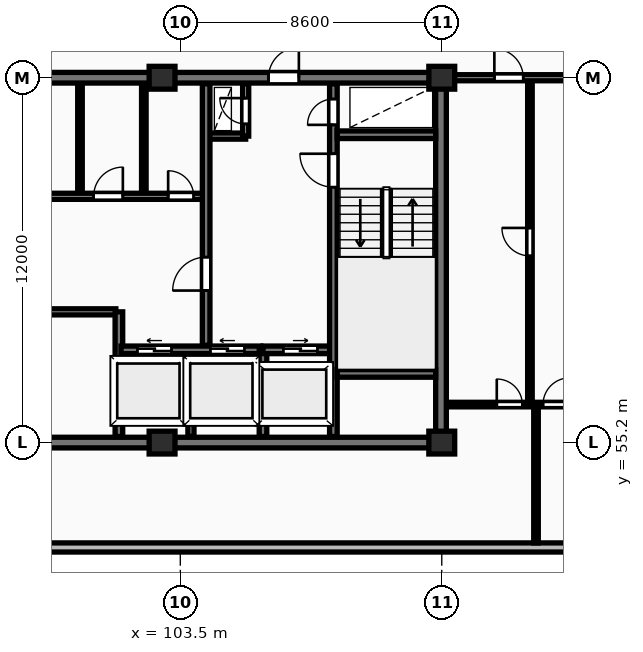
"""IFC4 building model, lengths in metres.
Left out: names, types, materials, properties, quantities, classifications, styles, units other than length and angle.
Written with IfcOpenShell. Run it as: python <this file> out.ifc"""

import sys

from ifc_helpers import new_model, si_unit, direction, frame, frame_2d, origin, origin_2d, place, context, subcontext, project, spatial, rectangle, extrude, element, fill, save


model = new_model("IFC4")
c1 = context("Model", 3, precision=1e-05, world=origin(), true_north=direction((0.0, 1.0)))
c2 = subcontext(c1, "Body", "Model", "MODEL_VIEW")
j1 = project(units=[si_unit("LENGTHUNIT", "METRE"), si_unit("PLANEANGLEUNIT", "RADIAN")], contexts=[c1])
p1 = place(None, origin())
s1 = spatial("IfcSite", under=j1, at=p1, CompositionType="ELEMENT")
p2 = place(p1, origin())
s2 = spatial("IfcBuilding", under=s1, at=p2, CompositionType="ELEMENT")
p3 = place(p2, frame((0.0, 0.0, 201.1)))
s3 = spatial("IfcBuildingStorey", under=s2, at=p3, CompositionType="ELEMENT", Elevation=201.1)
for number, where, z_axis, x_axis in (
    (1, (102.9, 55.2, 0.0), (0.0, 0.0, 1.0), (1.0, 0.0, 0.0)),
    (2, (102.9, 67.2, 0.0), (0.0, 0.0, 1.0), (1.0, 0.0, 0.0)),
    (3, (112.1, 55.2, 0.0), (0.0, 0.0, 1.0), (1.0, 0.0, 0.0)),
    (4, (112.1, 67.2, 0.0), (0.0, 0.0, 1.0), (1.0, 0.0, 0.0)),
):
    element("IfcColumn", number, at=place(p3, frame(where, z_axis=z_axis, x_axis=x_axis)), inside=s3, PredefinedType="COLUMN", context=c2, shape_type="SweptSolid", body=[
        extrude(rectangle(XDim=0.85, YDim=0.75, at=origin_2d()), origin(), (0.0, 0.0, 1.0), 3.25),
    ])
p4 = place(p3, frame((59.8, 51.75, 0.0), z_axis=(0.0, 0.0, 1.0), x_axis=(1.0, 0.0, 0.0)))
e5 = element("IfcWall", 5, at=p4, inside=s3, PredefinedType="STANDARD", context=c2, shape_type="SweptSolid", body=[
    extrude(rectangle(XDim=68.6, YDim=0.3, at=frame_2d((34.3, 0.0))), origin(), (0.0, 0.0, 1.0), 2.97),
])
p5 = place(p4, frame((13.025, 0.0, 0.85)))
e6 = element("IfcOpeningElement", 6, at=p5, cuts=e5, PredefinedType="OPENING", context=c2, shape_type="SweptSolid", body=[
    extrude(rectangle(XDim=1.8, YDim=1.8, at=frame_2d((0.9, 0.9))), frame((0.0, 0.16, 0.0), z_axis=(0.0, -1.0, 0.0), x_axis=(1.0, 0.0, 0.0)), (0.0, 0.0, 1.0), 0.32),
])
p6 = place(p4, frame((56.375, 0.0, 0.85)))
e7 = element("IfcOpeningElement", 7, at=p6, cuts=e5, PredefinedType="OPENING", context=c2, shape_type="SweptSolid", body=[
    extrude(rectangle(XDim=1.8, YDim=1.8, at=frame_2d((0.9, 0.9))), frame((0.0, 0.16, 0.0), z_axis=(0.0, -1.0, 0.0), x_axis=(1.0, 0.0, 0.0)), (0.0, 0.0, 1.0), 0.32),
])
p7 = place(p3, frame((75.95, 55.2, 0.0), z_axis=(0.0, 0.0, 1.0), x_axis=(1.0, 0.0, 0.0)))
e8 = element("IfcWall", 8, at=p7, inside=s3, PredefinedType="SHEAR", context=c2, shape_type="SweptSolid", body=[
    extrude(rectangle(XDim=36.3, YDim=0.35, at=frame_2d((18.15, 0.0))), origin(), (0.0, 0.0, 1.0), 3.25),
])
p8 = place(p3, frame((112.075, 55.375, 0.0), z_axis=(0.0, 0.0, 1.0), x_axis=(0.0, 1.0, 0.0)))
e9 = element("IfcWall", 9, at=p8, inside=s3, PredefinedType="SHEAR", context=c2, shape_type="SweptSolid", body=[
    extrude(rectangle(XDim=11.65, YDim=0.35, at=frame_2d((5.825, 0.0))), origin(), (0.0, 0.0, 1.0), 3.25),
])
p9 = place(p3, frame((75.95, 67.2, 0.0), z_axis=(0.0, 0.0, 1.0), x_axis=(1.0, 0.0, 0.0)))
e10 = element("IfcWall", 10, at=p9, inside=s3, PredefinedType="SHEAR", context=c2, shape_type="SweptSolid", body=[
    extrude(rectangle(XDim=36.3, YDim=0.35, at=frame_2d((18.15, 0.0))), origin(), (0.0, 0.0, 1.0), 3.25),
])
p10 = place(p9, frame((5.25, 0.0, 0.0)))
e11 = element("IfcOpeningElement", 11, at=p10, cuts=e10, PredefinedType="OPENING", context=c2, shape_type="SweptSolid", body=[
    extrude(rectangle(XDim=1.0, YDim=2.15, at=frame_2d((0.5, 1.075))), frame((0.0, 0.185, 0.0), z_axis=(0.0, -1.0, 0.0), x_axis=(1.0, 0.0, 0.0)), (0.0, 0.0, 1.0), 0.37),
])
p11 = place(p9, frame((21.6, 0.0, 0.0)))
e12 = element("IfcOpeningElement", 12, at=p11, cuts=e10, PredefinedType="OPENING", context=c2, shape_type="SweptSolid", body=[
    extrude(rectangle(XDim=1.5, YDim=2.2, at=frame_2d((0.75, 1.1))), frame((0.0, 0.185, 0.0), z_axis=(0.0, -1.0, 0.0), x_axis=(1.0, 0.0, 0.0)), (0.0, 0.0, 1.0), 0.37),
])
p12 = place(p9, frame((30.45, 0.0, 0.0)))
e13 = element("IfcOpeningElement", 13, at=p12, cuts=e10, PredefinedType="OPENING", context=c2, shape_type="SweptSolid", body=[
    extrude(rectangle(XDim=1.0, YDim=2.15, at=frame_2d((0.5, 1.075))), frame((0.0, 0.185, 0.0), z_axis=(0.0, -1.0, 0.0), x_axis=(1.0, 0.0, 0.0)), (0.0, 0.0, 1.0), 0.37),
])
p13 = place(p3, frame((93.02, 59.5, 0.0), z_axis=(0.0, 0.0, 1.0), x_axis=(1.0, 0.0, 0.0)))
e14 = element("IfcWall", 14, at=p13, inside=s3, PredefinedType="PARTITIONING", context=c2, shape_type="SweptSolid", body=[
    extrude(rectangle(XDim=8.36, YDim=0.2, at=frame_2d((4.18, 0.0))), origin(), (0.0, 0.0, 1.0), 2.97),
])
p14 = place(p13, frame((3.4, 0.0, 0.0)))
e15 = element("IfcOpeningElement", 15, at=p14, cuts=e14, PredefinedType="OPENING", context=c2, shape_type="SweptSolid", body=[
    extrude(rectangle(XDim=0.92, YDim=2.08, at=frame_2d((0.46, 1.04))), frame((0.0, 0.11, 0.0), z_axis=(0.0, -1.0, 0.0), x_axis=(1.0, 0.0, 0.0)), (0.0, 0.0, 1.0), 0.22),
])
p15 = place(p3, frame((101.48, 55.4, 0.0), z_axis=(0.0, 0.0, 1.0), x_axis=(0.0, 1.0, 0.0)))
e16 = element("IfcWall", 16, at=p15, inside=s3, PredefinedType="SHEAR", context=c2, shape_type="SweptSolid", body=[
    extrude(rectangle(XDim=4.1, YDim=0.25, at=frame_2d((2.05, 0.0))), origin(), (0.0, 0.0, 1.0), 3.25),
])
p16 = place(p3, frame((103.85, 55.4, 0.0), z_axis=(0.0, 0.0, 1.0), x_axis=(0.0, 1.0, 0.0)))
e17 = element("IfcWall", 17, at=p16, inside=s3, PredefinedType="PARTITIONING", context=c2, shape_type="SweptSolid", body=[
    extrude(rectangle(XDim=2.72, YDim=0.2, at=frame_2d((1.36, 0.0))), origin(), (0.0, 0.0, 1.0), 2.97),
])
p17 = place(p3, frame((101.55, 58.25, 0.0), z_axis=(0.0, 0.0, 1.0), x_axis=(1.0, 0.0, 0.0)))
e18 = element("IfcWall", 18, at=p17, inside=s3, PredefinedType="SHEAR", context=c2, shape_type="SweptSolid", body=[
    extrude(rectangle(XDim=4.6, YDim=0.25, at=frame_2d((2.3, 0.0))), origin(), (0.0, 0.0, 1.0), 3.25),
])
p18 = place(p17, frame((0.54, 0.0, 0.0)))
e19 = element("IfcOpeningElement", 19, at=p18, cuts=e18, PredefinedType="OPENING", context=c2, shape_type="SweptSolid", body=[
    extrude(rectangle(XDim=1.12, YDim=2.12, at=frame_2d((0.56, 1.06))), frame((0.0, 0.135, 0.0), z_axis=(0.0, -1.0, 0.0), x_axis=(1.0, 0.0, 0.0)), (0.0, 0.0, 1.0), 0.27),
])
p19 = place(p17, frame((2.94, 0.0, 0.0)))
e20 = element("IfcOpeningElement", 20, at=p19, cuts=e18, PredefinedType="OPENING", context=c2, shape_type="SweptSolid", body=[
    extrude(rectangle(XDim=1.12, YDim=2.12, at=frame_2d((0.56, 1.06))), frame((0.0, 0.135, 0.0), z_axis=(0.0, -1.0, 0.0), x_axis=(1.0, 0.0, 0.0)), (0.0, 0.0, 1.0), 0.27),
])
p20 = place(p3, frame((106.22, 55.4, 0.0), z_axis=(0.0, 0.0, 1.0), x_axis=(0.0, 1.0, 0.0)))
e21 = element("IfcWall", 21, at=p20, inside=s3, PredefinedType="SHEAR", context=c2, shape_type="SweptSolid", body=[
    extrude(rectangle(XDim=2.85, YDim=0.25, at=frame_2d((1.425, 0.0))), origin(), (0.0, 0.0, 1.0), 3.25),
])
p21 = place(p3, frame((106.22, 58.25, 0.0), z_axis=(0.0, 0.0, 1.0), x_axis=(1.0, 0.0, 0.0)))
e22 = element("IfcWall", 22, at=p21, inside=s3, PredefinedType="SHEAR", context=c2, shape_type="SweptSolid", body=[
    extrude(rectangle(XDim=2.46, YDim=0.25, at=frame_2d((1.23, 0.0))), origin(), (0.0, 0.0, 1.0), 3.25),
])
p22 = place(p21, frame((0.67, 0.0, 0.0)))
e23 = element("IfcOpeningElement", 23, at=p22, cuts=e22, PredefinedType="OPENING", context=c2, shape_type="SweptSolid", body=[
    extrude(rectangle(XDim=1.12, YDim=2.12, at=frame_2d((0.56, 1.06))), frame((0.0, 0.135, 0.0), z_axis=(0.0, -1.0, 0.0), x_axis=(1.0, 0.0, 0.0)), (0.0, 0.0, 1.0), 0.27),
])
for number, where, z_axis, x_axis in (
    (24, (102.3, 63.4, 0.0), (0.0, 0.0, 1.0), (0.0, 1.0, 0.0)),
    (25, (100.2, 63.4, 0.0), (0.0, 0.0, 1.0), (0.0, 1.0, 0.0)),
):
    element("IfcWall", number, at=place(p3, frame(where, z_axis=z_axis, x_axis=x_axis)), inside=s3, PredefinedType="PARTITIONING", context=c2, shape_type="SweptSolid", body=[
        extrude(rectangle(XDim=3.6, YDim=0.15, at=frame_2d((1.8, 0.0))), origin(), (0.0, 0.0, 1.0), 2.97),
    ])
p23 = place(p3, frame((84.42, 63.3, 0.0), z_axis=(0.0, 0.0, 1.0), x_axis=(1.0, 0.0, 0.0)))
e26 = element("IfcWall", 26, at=p23, inside=s3, PredefinedType="PARTITIONING", context=c2, shape_type="SweptSolid", body=[
    extrude(rectangle(XDim=19.83, YDim=0.2, at=frame_2d((9.915, 0.0))), origin(), (0.0, 0.0, 1.0), 2.97),
])
p24 = place(p23, frame((1.15, 0.0, 0.0)))
e27 = element("IfcOpeningElement", 27, at=p24, cuts=e26, PredefinedType="OPENING", context=c2, shape_type="SweptSolid", body=[
    extrude(rectangle(XDim=0.85, YDim=2.05, at=frame_2d((0.425, 1.025))), frame((0.0, 0.11, 0.0), z_axis=(0.0, -1.0, 0.0), x_axis=(1.0, 0.0, 0.0)), (0.0, 0.0, 1.0), 0.22),
])
p25 = place(p23, frame((3.25, 0.0, 0.0)))
e28 = element("IfcOpeningElement", 28, at=p25, cuts=e26, PredefinedType="OPENING", context=c2, shape_type="SweptSolid", body=[
    extrude(rectangle(XDim=0.85, YDim=2.05, at=frame_2d((0.425, 1.025))), frame((0.0, 0.11, 0.0), z_axis=(0.0, -1.0, 0.0), x_axis=(1.0, 0.0, 0.0)), (0.0, 0.0, 1.0), 0.22),
])
p26 = place(p23, frame((13.08, 0.0, 0.0)))
e29 = element("IfcOpeningElement", 29, at=p26, cuts=e26, PredefinedType="OPENING", context=c2, shape_type="SweptSolid", body=[
    extrude(rectangle(XDim=1.5, YDim=2.2, at=frame_2d((0.75, 1.1))), frame((0.0, 0.11, 0.0), z_axis=(0.0, -1.0, 0.0), x_axis=(1.0, 0.0, 0.0)), (0.0, 0.0, 1.0), 0.22),
])
p27 = place(p23, frame((5.53, 0.0, 0.0)))
e30 = element("IfcOpeningElement", 30, at=p27, cuts=e26, PredefinedType="OPENING", context=c2, shape_type="SweptSolid", body=[
    extrude(rectangle(XDim=0.88, YDim=2.06, at=frame_2d((0.44, 1.03))), frame((0.0, 0.11, 0.0), z_axis=(0.0, -1.0, 0.0), x_axis=(1.0, 0.0, 0.0)), (0.0, 0.0, 1.0), 0.22),
])
p28 = place(p23, frame((7.68, 0.0, 0.0)))
e31 = element("IfcOpeningElement", 31, at=p28, cuts=e26, PredefinedType="OPENING", context=c2, shape_type="SweptSolid", body=[
    extrude(rectangle(XDim=0.88, YDim=2.06, at=frame_2d((0.44, 1.03))), frame((0.0, 0.11, 0.0), z_axis=(0.0, -1.0, 0.0), x_axis=(1.0, 0.0, 0.0)), (0.0, 0.0, 1.0), 0.22),
])
p29 = place(p23, frame((10.43, 0.0, 0.0)))
e32 = element("IfcOpeningElement", 32, at=p29, cuts=e26, PredefinedType="OPENING", context=c2, shape_type="SweptSolid", body=[
    extrude(rectangle(XDim=0.85, YDim=2.05, at=frame_2d((0.425, 1.025))), frame((0.0, 0.11, 0.0), z_axis=(0.0, -1.0, 0.0), x_axis=(1.0, 0.0, 0.0)), (0.0, 0.0, 1.0), 0.22),
])
p30 = place(p23, frame((16.23, 0.0, 0.0)))
e33 = element("IfcOpeningElement", 33, at=p30, cuts=e26, PredefinedType="OPENING", context=c2, shape_type="SweptSolid", body=[
    extrude(rectangle(XDim=0.96, YDim=2.1, at=frame_2d((0.48, 1.05))), frame((0.0, 0.11, 0.0), z_axis=(0.0, -1.0, 0.0), x_axis=(1.0, 0.0, 0.0)), (0.0, 0.0, 1.0), 0.22),
])
p31 = place(p23, frame((18.68, 0.0, 0.0)))
e34 = element("IfcOpeningElement", 34, at=p31, cuts=e26, PredefinedType="OPENING", context=c2, shape_type="SweptSolid", body=[
    extrude(rectangle(XDim=0.84, YDim=2.04, at=frame_2d((0.42, 1.02))), frame((0.0, 0.11, 0.0), z_axis=(0.0, -1.0, 0.0), x_axis=(1.0, 0.0, 0.0)), (0.0, 0.0, 1.0), 0.22),
])
p32 = place(p3, frame((104.45, 65.28, 0.0), z_axis=(0.0, 0.0, 1.0), x_axis=(1.0, 0.0, 0.0)))
e35 = element("IfcWall", 35, at=p32, inside=s3, PredefinedType="PARTITIONING", context=c2, shape_type="SweptSolid", body=[
    extrude(rectangle(XDim=1.2, YDim=0.2, at=frame_2d((0.6, 0.0))), origin(), (0.0, 0.0, 1.0), 2.97),
])
p33 = place(p3, frame((105.65, 65.28, 0.0), z_axis=(0.0, 0.0, 1.0), x_axis=(0.0, 1.0, 0.0)))
e36 = element("IfcWall", 36, at=p33, inside=s3, PredefinedType="PARTITIONING", context=c2, shape_type="SweptSolid", body=[
    extrude(rectangle(XDim=1.72, YDim=0.2, at=frame_2d((0.86, 0.0))), origin(), (0.0, 0.0, 1.0), 2.97),
])
p34 = place(p33, frame((0.4, 0.0, 0.0)))
e37 = element("IfcOpeningElement", 37, at=p34, cuts=e36, PredefinedType="OPENING", context=c2, shape_type="SweptSolid", body=[
    extrude(rectangle(XDim=0.85, YDim=2.05, at=frame_2d((0.425, 1.025))), frame((0.0, 0.11, 0.0), z_axis=(0.0, -1.0, 0.0), x_axis=(1.0, 0.0, 0.0)), (0.0, 0.0, 1.0), 0.22),
])
p35 = place(p3, frame((104.35, 58.4, 0.0), z_axis=(0.0, 0.0, 1.0), x_axis=(0.0, 1.0, 0.0)))
e38 = element("IfcWall", 38, at=p35, inside=s3, PredefinedType="SHEAR", context=c2, shape_type="SweptSolid", body=[
    extrude(rectangle(XDim=8.6, YDim=0.25, at=frame_2d((4.3, 0.0))), origin(), (0.0, 0.0, 1.0), 3.25),
])
p36 = place(p35, frame((1.8, 0.0, 0.0)))
e39 = element("IfcOpeningElement", 39, at=p36, cuts=e38, PredefinedType="OPENING", context=c2, shape_type="SweptSolid", body=[
    extrude(rectangle(XDim=1.1, YDim=2.1, at=frame_2d((0.55, 1.05))), frame((0.0, 0.135, 0.0), z_axis=(0.0, -1.0, 0.0), x_axis=(1.0, 0.0, 0.0)), (0.0, 0.0, 1.0), 0.27),
])
p37 = place(p3, frame((108.535, 55.4, 0.0), z_axis=(0.0, 0.0, 1.0), x_axis=(0.0, 1.0, 0.0)))
e40 = element("IfcWall", 40, at=p37, inside=s3, PredefinedType="SHEAR", context=c2, shape_type="SweptSolid", body=[
    extrude(rectangle(XDim=11.6, YDim=0.25, at=frame_2d((5.8, 0.0))), origin(), (0.0, 0.0, 1.0), 3.25),
])
p38 = place(p37, frame((8.2, 0.0, 0.0)))
e41 = element("IfcOpeningElement", 41, at=p38, cuts=e40, PredefinedType="OPENING", context=c2, shape_type="SweptSolid", body=[
    extrude(rectangle(XDim=1.1, YDim=2.1, at=frame_2d((0.55, 1.05))), frame((0.0, 0.135, 0.0), z_axis=(0.0, -1.0, 0.0), x_axis=(1.0, 0.0, 0.0)), (0.0, 0.0, 1.0), 0.27),
])
p39 = place(p37, frame((10.25, 0.0, 0.0)))
e42 = element("IfcOpeningElement", 42, at=p39, cuts=e40, PredefinedType="OPENING", context=c2, shape_type="SweptSolid", body=[
    extrude(rectangle(XDim=0.85, YDim=2.05, at=frame_2d((0.425, 1.025))), frame((0.0, 0.135, 0.0), z_axis=(0.0, -1.0, 0.0), x_axis=(1.0, 0.0, 0.0)), (0.0, 0.0, 1.0), 0.27),
])
for number, where, z_axis, x_axis in (
    (43, (108.66, 57.475, 0.0), (0.0, 0.0, 1.0), (1.0, 0.0, 0.0)),
    (44, (108.66, 65.325, 0.0), (0.0, 0.0, 1.0), (1.0, 0.0, 0.0)),
):
    element("IfcWall", number, at=place(p3, frame(where, z_axis=z_axis, x_axis=x_axis)), inside=s3, PredefinedType="SHEAR", context=c2, shape_type="SweptSolid", body=[
        extrude(rectangle(XDim=3.24, YDim=0.25, at=frame_2d((1.62, 0.0))), origin(), (0.0, 0.0, 1.0), 3.25),
    ])
p40 = place(p3, frame((115.0, 56.45, 0.0), z_axis=(0.0, 0.0, 1.0), x_axis=(0.0, 1.0, 0.0)))
e45 = element("IfcWall", 45, at=p40, inside=s3, PredefinedType="PARTITIONING", context=c2, shape_type="SweptSolid", body=[
    extrude(rectangle(XDim=10.7, YDim=0.15, at=frame_2d((5.35, 0.0))), origin(), (0.0, 0.0, 1.0), 2.97),
])
p41 = place(p40, frame((4.89, 0.0, 0.0)))
e46 = element("IfcOpeningElement", 46, at=p41, cuts=e45, PredefinedType="OPENING", context=c2, shape_type="SweptSolid", body=[
    extrude(rectangle(XDim=0.92, YDim=2.08, at=frame_2d((0.46, 1.04))), frame((0.0, 0.085, 0.0), z_axis=(0.0, -1.0, 0.0), x_axis=(1.0, 0.0, 0.0)), (0.0, 0.0, 1.0), 0.17),
])
p42 = place(p3, frame((115.2, 51.9, 0.0), z_axis=(0.0, 0.0, 1.0), x_axis=(0.0, 1.0, 0.0)))
e47 = element("IfcWall", 47, at=p42, inside=s3, PredefinedType="PARTITIONING", context=c2, shape_type="SweptSolid", body=[
    extrude(rectangle(XDim=4.55, YDim=0.15, at=frame_2d((2.275, 0.0))), origin(), (0.0, 0.0, 1.0), 2.97),
])
p43 = place(p3, frame((112.27, 56.45, 0.0), z_axis=(0.0, 0.0, 1.0), x_axis=(1.0, 0.0, 0.0)))
e48 = element("IfcWall", 48, at=p43, inside=s3, PredefinedType="PARTITIONING", context=c2, shape_type="SweptSolid", body=[
    extrude(rectangle(XDim=6.76, YDim=0.15, at=frame_2d((3.38, 0.0))), origin(), (0.0, 0.0, 1.0), 2.97),
])
p44 = place(p43, frame((1.64, 0.0, 0.0)))
e49 = element("IfcOpeningElement", 49, at=p44, cuts=e48, PredefinedType="OPENING", context=c2, shape_type="SweptSolid", body=[
    extrude(rectangle(XDim=0.84, YDim=2.04, at=frame_2d((0.42, 1.02))), frame((0.0, 0.085, 0.0), z_axis=(0.0, -1.0, 0.0), x_axis=(1.0, 0.0, 0.0)), (0.0, 0.0, 1.0), 0.17),
])
p45 = place(p43, frame((3.16, 0.0, 0.0)))
e50 = element("IfcOpeningElement", 50, at=p45, cuts=e48, PredefinedType="OPENING", context=c2, shape_type="SweptSolid", body=[
    extrude(rectangle(XDim=0.88, YDim=2.06, at=frame_2d((0.44, 1.03))), frame((0.0, 0.085, 0.0), z_axis=(0.0, -1.0, 0.0), x_axis=(1.0, 0.0, 0.0)), (0.0, 0.0, 1.0), 0.17),
])
p46 = place(p3, frame((112.25, 67.2, 0.0), z_axis=(0.0, 0.0, 1.0), x_axis=(1.0, 0.0, 0.0)))
e51 = element("IfcWall", 51, at=p46, inside=s3, PredefinedType="PARTITIONING", context=c2, shape_type="SweptSolid", body=[
    extrude(rectangle(XDim=16.15, YDim=0.2, at=frame_2d((8.075, 0.0))), origin(), (0.0, 0.0, 1.0), 2.433),
])
p47 = place(p46, frame((1.58, 0.0, 0.0)))
e52 = element("IfcOpeningElement", 52, at=p47, cuts=e51, PredefinedType="OPENING", context=c2, shape_type="SweptSolid", body=[
    extrude(rectangle(XDim=0.95, YDim=2.15, at=frame_2d((0.475, 1.075))), frame((0.0, 0.11, 0.0), z_axis=(0.0, -1.0, 0.0), x_axis=(1.0, 0.0, 0.0)), (0.0, 0.0, 1.0), 0.22),
])
p48 = place(p12, origin())
e53 = element("IfcDoor", 53, at=p48, inside=s3, OperationType="SINGLE_SWING_RIGHT", PredefinedType="DOOR", context=c2, shape_type="SweptSolid", body=[
    extrude(rectangle(XDim=1.0, YDim=2.15, at=frame_2d((0.5, 1.075))), frame((0.0, 0.025, 0.0), z_axis=(0.0, -1.0, 0.0), x_axis=(1.0, 0.0, 0.0)), (0.0, 0.0, 1.0), 0.05),
])
fill(e13, e53)
p49 = place(p18, origin())
e54 = element("IfcDoor", 54, at=p49, inside=s3, OperationType="SLIDING_TO_LEFT", PredefinedType="DOOR", context=c2, shape_type="SweptSolid", body=[
    extrude(rectangle(XDim=1.12, YDim=2.12, at=frame_2d((0.56, 1.06))), frame((0.0, 0.025, 0.0), z_axis=(0.0, -1.0, 0.0), x_axis=(1.0, 0.0, 0.0)), (0.0, 0.0, 1.0), 0.05),
])
fill(e19, e54)
p50 = place(p19, origin())
e55 = element("IfcDoor", 55, at=p50, inside=s3, OperationType="SLIDING_TO_LEFT", PredefinedType="DOOR", context=c2, shape_type="SweptSolid", body=[
    extrude(rectangle(XDim=1.12, YDim=2.12, at=frame_2d((0.56, 1.06))), frame((0.0, 0.025, 0.0), z_axis=(0.0, -1.0, 0.0), x_axis=(1.0, 0.0, 0.0)), (0.0, 0.0, 1.0), 0.05),
])
fill(e20, e55)
p51 = place(p22, origin())
e56 = element("IfcDoor", 56, at=p51, inside=s3, OperationType="SLIDING_TO_RIGHT", PredefinedType="DOOR", context=c2, shape_type="SweptSolid", body=[
    extrude(rectangle(XDim=1.12, YDim=2.12, at=frame_2d((0.56, 1.06))), frame((0.0, 0.025, 0.0), z_axis=(0.0, -1.0, 0.0), x_axis=(1.0, 0.0, 0.0)), (0.0, 0.0, 1.0), 0.05),
])
fill(e23, e56)
p52 = place(p30, origin())
e57 = element("IfcDoor", 57, at=p52, inside=s3, OperationType="SINGLE_SWING_RIGHT", PredefinedType="DOOR", context=c2, shape_type="SweptSolid", body=[
    extrude(rectangle(XDim=0.96, YDim=2.1, at=frame_2d((0.48, 1.05))), frame((0.0, 0.025, 0.0), z_axis=(0.0, -1.0, 0.0), x_axis=(1.0, 0.0, 0.0)), (0.0, 0.0, 1.0), 0.05),
])
fill(e33, e57)
p53 = place(p31, origin())
e58 = element("IfcDoor", 58, at=p53, inside=s3, OperationType="SINGLE_SWING_LEFT", PredefinedType="DOOR", context=c2, shape_type="SweptSolid", body=[
    extrude(rectangle(XDim=0.84, YDim=2.04, at=frame_2d((0.42, 1.02))), frame((0.0, 0.025, 0.0), z_axis=(0.0, -1.0, 0.0), x_axis=(1.0, 0.0, 0.0)), (0.0, 0.0, 1.0), 0.05),
])
fill(e34, e58)
p54 = place(p34, origin())
e59 = element("IfcDoor", 59, at=p54, inside=s3, OperationType="SINGLE_SWING_RIGHT", PredefinedType="DOOR", context=c2, shape_type="SweptSolid", body=[
    extrude(rectangle(XDim=0.85, YDim=2.05, at=frame_2d((0.425, 1.025))), frame((0.0, 0.025, 0.0), z_axis=(0.0, -1.0, 0.0), x_axis=(1.0, 0.0, 0.0)), (0.0, 0.0, 1.0), 0.05),
])
fill(e37, e59)
p55 = place(p36, origin())
e60 = element("IfcDoor", 60, at=p55, inside=s3, OperationType="SINGLE_SWING_LEFT", PredefinedType="DOOR", context=c2, shape_type="SweptSolid", body=[
    extrude(rectangle(XDim=1.1, YDim=2.1, at=frame_2d((0.55, 1.05))), frame((0.0, 0.025, 0.0), z_axis=(0.0, -1.0, 0.0), x_axis=(1.0, 0.0, 0.0)), (0.0, 0.0, 1.0), 0.05),
])
fill(e39, e60)
p56 = place(p38, origin())
e61 = element("IfcDoor", 61, at=p56, inside=s3, OperationType="SINGLE_SWING_RIGHT", PredefinedType="DOOR", context=c2, shape_type="SweptSolid", body=[
    extrude(rectangle(XDim=1.1, YDim=2.1, at=frame_2d((0.55, 1.05))), frame((0.0, 0.025, 0.0), z_axis=(0.0, -1.0, 0.0), x_axis=(1.0, 0.0, 0.0)), (0.0, 0.0, 1.0), 0.05),
])
fill(e41, e61)
p57 = place(p39, origin())
e62 = element("IfcDoor", 62, at=p57, inside=s3, OperationType="SINGLE_SWING_LEFT", PredefinedType="DOOR", context=c2, shape_type="SweptSolid", body=[
    extrude(rectangle(XDim=0.85, YDim=2.05, at=frame_2d((0.425, 1.025))), frame((0.0, 0.025, 0.0), z_axis=(0.0, -1.0, 0.0), x_axis=(1.0, 0.0, 0.0)), (0.0, 0.0, 1.0), 0.05),
])
fill(e42, e62)
p58 = place(p41, origin())
e63 = element("IfcDoor", 63, at=p58, inside=s3, OperationType="SINGLE_SWING_RIGHT", PredefinedType="DOOR", context=c2, shape_type="SweptSolid", body=[
    extrude(rectangle(XDim=0.92, YDim=2.08, at=frame_2d((0.46, 1.04))), frame((0.0, 0.025, 0.0), z_axis=(0.0, -1.0, 0.0), x_axis=(1.0, 0.0, 0.0)), (0.0, 0.0, 1.0), 0.05),
])
fill(e46, e63)
p59 = place(p44, origin())
e64 = element("IfcDoor", 64, at=p59, inside=s3, OperationType="SINGLE_SWING_LEFT", PredefinedType="DOOR", context=c2, shape_type="SweptSolid", body=[
    extrude(rectangle(XDim=0.84, YDim=2.04, at=frame_2d((0.42, 1.02))), frame((0.0, 0.025, 0.0), z_axis=(0.0, -1.0, 0.0), x_axis=(1.0, 0.0, 0.0)), (0.0, 0.0, 1.0), 0.05),
])
fill(e49, e64)
p60 = place(p45, origin())
e65 = element("IfcDoor", 65, at=p60, inside=s3, OperationType="SINGLE_SWING_RIGHT", PredefinedType="DOOR", context=c2, shape_type="SweptSolid", body=[
    extrude(rectangle(XDim=0.88, YDim=2.06, at=frame_2d((0.44, 1.03))), frame((0.0, 0.025, 0.0), z_axis=(0.0, -1.0, 0.0), x_axis=(1.0, 0.0, 0.0)), (0.0, 0.0, 1.0), 0.05),
])
fill(e50, e65)
p61 = place(p47, origin())
e66 = element("IfcDoor", 66, at=p61, inside=s3, OperationType="SINGLE_SWING_LEFT", PredefinedType="DOOR", context=c2, shape_type="SweptSolid", body=[
    extrude(rectangle(XDim=0.95, YDim=2.15, at=frame_2d((0.475, 1.075))), frame((0.0, 0.025, 0.0), z_axis=(0.0, -1.0, 0.0), x_axis=(1.0, 0.0, 0.0)), (0.0, 0.0, 1.0), 0.05),
])
fill(e52, e66)
save(model, sys.argv[1])
